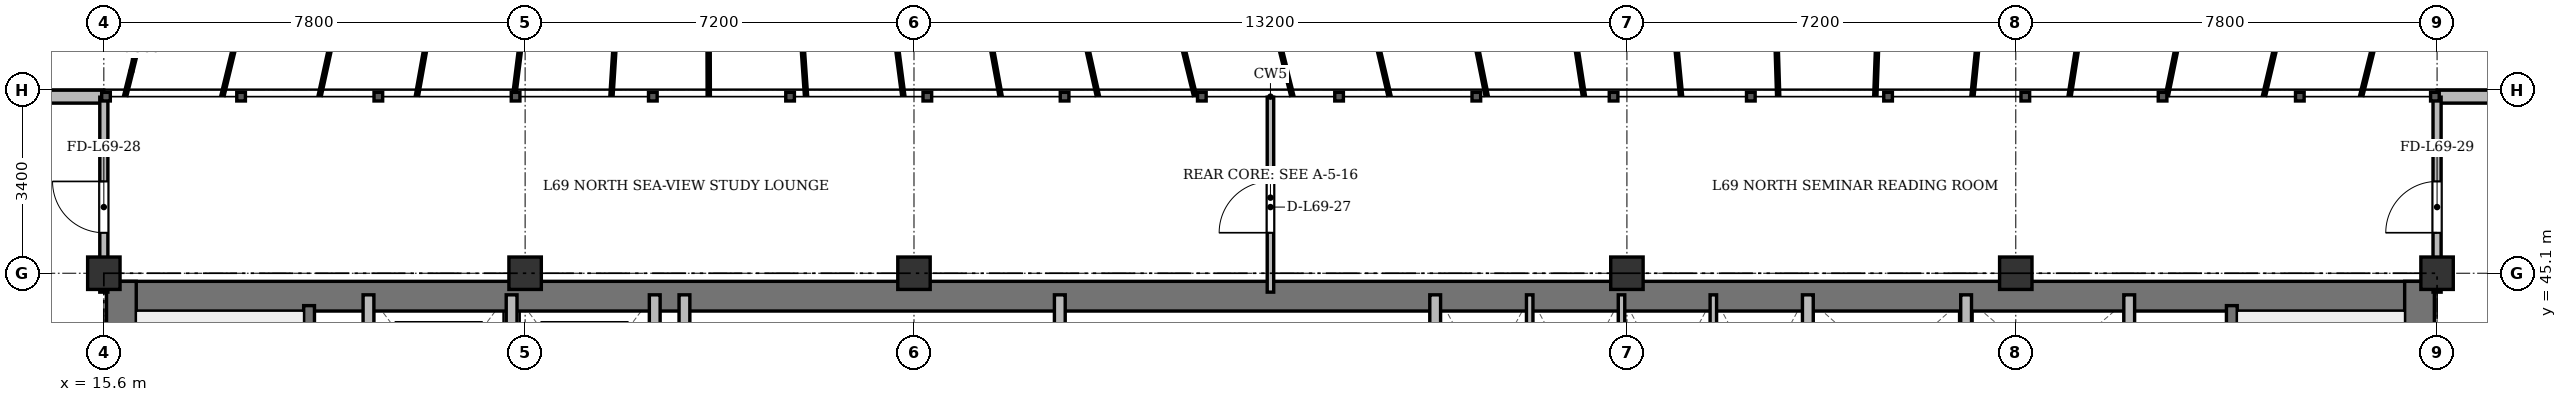
"""IFC4 building model, lengths in metres.
Left out: names, types, materials, properties, quantities, classifications, styles, units other than length and angle.
Written with IfcOpenShell. Run it as: python <this file> out.ifc"""

import sys

from ifc_helpers import new_model, si_unit, direction, frame, frame_2d, origin, origin_2d, place, context, subcontext, project, spatial, rectangle, extrude, source, transform, mapped, element, fill, save


model = new_model("IFC4")
c1 = context("Model", 3, precision=1e-05, world=origin(), true_north=direction((0.0, 1.0)))
c2 = subcontext(c1, "Body", "Model", "MODEL_VIEW")
j1 = project(units=[si_unit("LENGTHUNIT", "METRE"), si_unit("PLANEANGLEUNIT", "RADIAN")], contexts=[c1])
p1 = place(None, origin())
s1 = spatial("IfcSite", under=j1, at=p1, CompositionType="ELEMENT")
p2 = place(p1, origin())
s2 = spatial("IfcBuilding", under=s1, at=p2, CompositionType="ELEMENT")
p3 = place(p2, frame((0.0, 0.0, 266.7)))
s3 = spatial("IfcBuildingStorey", under=s2, at=p3, CompositionType="ELEMENT", Elevation=266.7)
m1 = source(origin(), c2, "Body", "SweptSolid", [
    extrude(rectangle(XDim=0.6, YDim=0.6, at=origin_2d()), origin(), (0.0, 0.0, 1.0), 3.6),
])
for number, where, z_axis, x_axis in (
    (1, (15.6, 45.1, 0.0), (0.0, 0.0, 1.0), (1.0, 0.0, 0.0)),
    (2, (23.4, 45.1, 0.0), (0.0, 0.0, 1.0), (1.0, 0.0, 0.0)),
    (3, (30.6, 45.1, 0.0), (0.0, 0.0, 1.0), (1.0, 0.0, 0.0)),
    (4, (43.8, 45.1, 0.0), (0.0, 0.0, 1.0), (1.0, 0.0, 0.0)),
    (5, (51.0, 45.1, 0.0), (0.0, 0.0, 1.0), (1.0, 0.0, 0.0)),
    (6, (58.8, 45.1, 0.0), (0.0, 0.0, 1.0), (1.0, 0.0, 0.0)),
):
    element("IfcColumn", number, at=place(p3, frame(where, z_axis=z_axis, x_axis=x_axis)), inside=s3, PredefinedType="COLUMN", context=c2, shape_type="MappedRepresentation", body=[
        mapped(m1, transform((0.0, 0.0, 0.0), x_axis=(1.0, 0.0, 0.0), y_axis=(0.0, 1.0, 0.0), z_axis=(0.0, 0.0, 1.0), scale=1.0)),
    ])
p4 = place(p3, frame((11.3, 48.37, 0.0), z_axis=(0.0, 0.0, 1.0), x_axis=(1.0, 0.0, 0.0)))
e7 = element("IfcWall", 7, at=p4, inside=s3, PredefinedType="SOLIDWALL", context=c2, shape_type="SweptSolid", body=[
    extrude(rectangle(XDim=4.3, YDim=0.24, at=frame_2d((2.15, 0.0))), origin(), (0.0, 0.0, 1.0), 3.37),
])
p5 = place(p4, frame((1.848, 0.0, 0.9)))
e8 = element("IfcOpeningElement", 8, at=p5, cuts=e7, PredefinedType="OPENING", context=c2, shape_type="SweptSolid", body=[
    extrude(rectangle(XDim=1.35, YDim=1.5, at=frame_2d((0.675, 0.75))), frame((0.0, 0.13, 0.0), z_axis=(0.0, -1.0, 0.0), x_axis=(1.0, 0.0, 0.0)), (0.0, 0.0, 1.0), 0.26),
])
p6 = place(p3, frame((58.8, 48.37, 0.0), z_axis=(0.0, 0.0, 1.0), x_axis=(1.0, 0.0, 0.0)))
e9 = element("IfcWall", 9, at=p6, inside=s3, PredefinedType="SOLIDWALL", context=c2, shape_type="SweptSolid", body=[
    extrude(rectangle(XDim=4.3, YDim=0.24, at=frame_2d((2.15, 0.0))), origin(), (0.0, 0.0, 1.0), 3.37),
])
p7 = place(p6, frame((1.475, 0.0, 0.9)))
e10 = element("IfcOpeningElement", 10, at=p7, cuts=e9, PredefinedType="OPENING", context=c2, shape_type="SweptSolid", body=[
    extrude(rectangle(XDim=1.35, YDim=1.5, at=frame_2d((0.675, 0.75))), frame((0.0, 0.13, 0.0), z_axis=(0.0, -1.0, 0.0), x_axis=(1.0, 0.0, 0.0)), (0.0, 0.0, 1.0), 0.26),
])
p8 = place(p3, frame((15.65, 44.675, 0.0), z_axis=(0.0, 0.0, 1.0), x_axis=(1.0, 0.0, 0.0)))
e11 = element("IfcWall", 11, at=p8, inside=s3, PredefinedType="SHEAR", context=c2, shape_type="SweptSolid", body=[
    extrude(rectangle(XDim=43.1, YDim=0.55, at=frame_2d((21.55, 0.0))), origin(), (0.0, 0.0, 1.0), 3.37),
])
for number, where, z_axis, x_axis in (
    (12, (15.925, 33.4, 0.0), (0.0, 0.0, 1.0), (0.0, 1.0, 0.0)),
    (13, (58.475, 33.4, 0.0), (0.0, 0.0, 1.0), (0.0, 1.0, 0.0)),
):
    element("IfcWall", number, at=place(p3, frame(where, z_axis=z_axis, x_axis=x_axis)), inside=s3, PredefinedType="SHEAR", context=c2, shape_type="SweptSolid", body=[
        extrude(rectangle(XDim=11.55, YDim=0.55, at=frame_2d((5.775, 0.0))), origin(), (0.0, 0.0, 1.0), 3.37),
    ])
p9 = place(p3, frame((19.4, 33.4, 0.0), z_axis=(0.0, 0.0, 1.0), x_axis=(0.0, 1.0, 0.0)))
e14 = element("IfcWall", 14, at=p9, inside=s3, PredefinedType="SHEAR", context=c2, shape_type="SweptSolid", body=[
    extrude(rectangle(XDim=11.1, YDim=0.2, at=frame_2d((5.55, 0.0))), origin(), (0.0, 0.0, 1.0), 3.37),
])
p10 = place(p9, frame((0.85, 0.0, 0.0)))
e15 = element("IfcOpeningElement", 15, at=p10, cuts=e14, PredefinedType="OPENING", context=c2, shape_type="SweptSolid", body=[
    extrude(rectangle(XDim=1.1, YDim=2.15, at=frame_2d((0.55, 1.075))), frame((0.0, 0.11, 0.0), z_axis=(0.0, -1.0, 0.0), x_axis=(1.0, 0.0, 0.0)), (0.0, 0.0, 1.0), 0.22),
])
p11 = place(p3, frame((55.0, 33.4, 0.0), z_axis=(0.0, 0.0, 1.0), x_axis=(0.0, 1.0, 0.0)))
e16 = element("IfcWall", 16, at=p11, inside=s3, PredefinedType="SHEAR", context=c2, shape_type="SweptSolid", body=[
    extrude(rectangle(XDim=11.1, YDim=0.2, at=frame_2d((5.55, 0.0))), origin(), (0.0, 0.0, 1.0), 3.37),
])
p12 = place(p11, frame((0.85, 0.0, 0.0)))
e17 = element("IfcOpeningElement", 17, at=p12, cuts=e16, PredefinedType="OPENING", context=c2, shape_type="SweptSolid", body=[
    extrude(rectangle(XDim=1.1, YDim=2.15, at=frame_2d((0.55, 1.075))), frame((0.0, 0.11, 0.0), z_axis=(0.0, -1.0, 0.0), x_axis=(1.0, 0.0, 0.0)), (0.0, 0.0, 1.0), 0.22),
])
for number, where, z_axis, x_axis in (
    (18, (20.5, 41.3, 0.0), (0.0, 0.0, 1.0), (0.0, 1.0, 0.0)),
    (19, (23.15, 41.3, 0.0), (0.0, 0.0, 1.0), (0.0, 1.0, 0.0)),
    (20, (25.8, 41.3, 0.0), (0.0, 0.0, 1.0), (0.0, 1.0, 0.0)),
):
    element("IfcWall", number, at=place(p3, frame(where, z_axis=z_axis, x_axis=x_axis)), inside=s3, PredefinedType="SOLIDWALL", context=c2, shape_type="SweptSolid", body=[
        extrude(rectangle(XDim=3.4, YDim=0.2, at=frame_2d((1.7, 0.0))), origin(), (0.0, 0.0, 1.0), 3.37),
    ])
for number, where, z_axis, x_axis in (
    (21, (26.35, 33.4, 0.0), (0.0, 0.0, 1.0), (0.0, 1.0, 0.0)),
    (22, (33.3, 33.4, 0.0), (0.0, 0.0, 1.0), (0.0, 1.0, 0.0)),
):
    element("IfcWall", number, at=place(p3, frame(where, z_axis=z_axis, x_axis=x_axis)), inside=s3, PredefinedType="SOLIDWALL", context=c2, shape_type="SweptSolid", body=[
        extrude(rectangle(XDim=11.3, YDim=0.2, at=frame_2d((5.65, 0.0))), origin(), (0.0, 0.0, 1.0), 2.92),
    ])
p13 = place(p3, frame((40.25, 41.5, 0.0), z_axis=(0.0, 0.0, 1.0), x_axis=(0.0, 1.0, 0.0)))
e23 = element("IfcWall", 23, at=p13, inside=s3, PredefinedType="SOLIDWALL", context=c2, shape_type="SweptSolid", body=[
    extrude(rectangle(XDim=3.2, YDim=0.2, at=frame_2d((1.6, 0.0))), origin(), (0.0, 0.0, 1.0), 3.37),
])
for number, where, z_axis, x_axis in (
    (24, (42.0, 41.5, 0.0), (0.0, 0.0, 1.0), (0.0, 1.0, 0.0)),
    (25, (43.7, 41.5, 0.0), (0.0, 0.0, 1.0), (0.0, 1.0, 0.0)),
    (26, (45.4, 41.5, 0.0), (0.0, 0.0, 1.0), (0.0, 1.0, 0.0)),
):
    element("IfcWall", number, at=place(p3, frame(where, z_axis=z_axis, x_axis=x_axis)), inside=s3, PredefinedType="PARTITIONING", context=c2, shape_type="SweptSolid", body=[
        extrude(rectangle(XDim=3.2, YDim=0.12, at=frame_2d((1.6, 0.0))), origin(), (0.0, 0.0, 1.0), 3.37),
    ])
p14 = place(p3, frame((47.15, 33.4, 0.0), z_axis=(0.0, 0.0, 1.0), x_axis=(0.0, 1.0, 0.0)))
e27 = element("IfcWall", 27, at=p14, inside=s3, PredefinedType="SOLIDWALL", context=c2, shape_type="SweptSolid", body=[
    extrude(rectangle(XDim=11.3, YDim=0.2, at=frame_2d((5.65, 0.0))), origin(), (0.0, 0.0, 1.0), 2.92),
])
for number, where, z_axis, x_axis in (
    (28, (50.08, 42.05, 0.0), (0.0, 0.0, 1.0), (0.0, 1.0, 0.0)),
    (29, (53.1, 42.05, 0.0), (0.0, 0.0, 1.0), (0.0, 1.0, 0.0)),
):
    element("IfcWall", number, at=place(p3, frame(where, z_axis=z_axis, x_axis=x_axis)), inside=s3, PredefinedType="SOLIDWALL", context=c2, shape_type="SweptSolid", body=[
        extrude(rectangle(XDim=2.65, YDim=0.2, at=frame_2d((1.325, 0.0))), origin(), (0.0, 0.0, 1.0), 3.37),
    ])
p15 = place(p3, frame((37.2, 44.75, 0.0), z_axis=(0.0, 0.0, 1.0), x_axis=(0.0, 1.0, 0.0)))
e30 = element("IfcWall", 30, at=p15, inside=s3, PredefinedType="PARTITIONING", context=c2, shape_type="SweptSolid", body=[
    extrude(rectangle(XDim=3.61, YDim=0.12, at=frame_2d((1.805, 0.0))), origin(), (0.0, 0.0, 1.0), 2.92),
])
p16 = place(p15, frame((1.1, 0.0, 0.0)))
e31 = element("IfcOpeningElement", 31, at=p16, cuts=e30, PredefinedType="OPENING", context=c2, shape_type="SweptSolid", body=[
    extrude(rectangle(XDim=0.95, YDim=2.15, at=frame_2d((0.475, 1.075))), frame((0.0, 0.07, 0.0), z_axis=(0.0, -1.0, 0.0), x_axis=(1.0, 0.0, 0.0)), (0.0, 0.0, 1.0), 0.14),
])
p17 = place(p3, frame((15.6, 44.75, 0.0), z_axis=(0.0, 0.0, 1.0), x_axis=(0.0, 1.0, 0.0)))
e32 = element("IfcWall", 32, at=p17, inside=s3, PredefinedType="PARTITIONING", context=c2, shape_type="SweptSolid", body=[
    extrude(rectangle(XDim=3.61, YDim=0.15, at=frame_2d((1.805, 0.0))), origin(), (0.0, 0.0, 1.0), 2.87),
])
p18 = place(p17, frame((1.1, 0.0, 0.0)))
e33 = element("IfcOpeningElement", 33, at=p18, cuts=e32, PredefinedType="OPENING", context=c2, shape_type="SweptSolid", body=[
    extrude(rectangle(XDim=0.95, YDim=2.15, at=frame_2d((0.475, 1.075))), frame((0.0, 0.085, 0.0), z_axis=(0.0, -1.0, 0.0), x_axis=(1.0, 0.0, 0.0)), (0.0, 0.0, 1.0), 0.17),
])
p19 = place(p3, frame((58.8, 44.75, 0.0), z_axis=(0.0, 0.0, 1.0), x_axis=(0.0, 1.0, 0.0)))
e34 = element("IfcWall", 34, at=p19, inside=s3, PredefinedType="PARTITIONING", context=c2, shape_type="SweptSolid", body=[
    extrude(rectangle(XDim=3.61, YDim=0.15, at=frame_2d((1.805, 0.0))), origin(), (0.0, 0.0, 1.0), 2.87),
])
p20 = place(p19, frame((1.1, 0.0, 0.0)))
e35 = element("IfcOpeningElement", 35, at=p20, cuts=e34, PredefinedType="OPENING", context=c2, shape_type="SweptSolid", body=[
    extrude(rectangle(XDim=0.95, YDim=2.15, at=frame_2d((0.475, 1.075))), frame((0.0, 0.085, 0.0), z_axis=(0.0, -1.0, 0.0), x_axis=(1.0, 0.0, 0.0)), (0.0, 0.0, 1.0), 0.17),
])
m2 = source(origin(), c2, "Body", "SweptSolid", [
    extrude(rectangle(XDim=0.95, YDim=2.15, at=frame_2d((0.475, 1.075))), frame((0.0, 0.025, 0.0), z_axis=(0.0, -1.0, 0.0), x_axis=(1.0, 0.0, 0.0)), (0.0, 0.0, 1.0), 0.05),
])
p21 = place(p16, origin())
e36 = element("IfcDoor", 36, at=p21, inside=s3, OperationType="SINGLE_SWING_LEFT", PredefinedType="DOOR", context=c2, shape_type="MappedRepresentation", body=[
    mapped(m2, transform((0.0, 0.0, 0.0), x_axis=(1.0, 0.0, 0.0), y_axis=(0.0, 1.0, 0.0), z_axis=(0.0, 0.0, 1.0), scale=1.0)),
])
fill(e31, e36)
p22 = place(p18, origin())
e37 = element("IfcDoor", 37, at=p22, inside=s3, OperationType="SINGLE_SWING_RIGHT", PredefinedType="DOOR", context=c2, shape_type="MappedRepresentation", body=[
    mapped(m2, transform((0.0, 0.0, 0.0), x_axis=(1.0, 0.0, 0.0), y_axis=(0.0, 1.0, 0.0), z_axis=(0.0, 0.0, 1.0), scale=1.0)),
])
fill(e33, e37)
p23 = place(p20, origin())
e38 = element("IfcDoor", 38, at=p23, inside=s3, OperationType="SINGLE_SWING_LEFT", PredefinedType="DOOR", context=c2, shape_type="MappedRepresentation", body=[
    mapped(m2, transform((0.0, 0.0, 0.0), x_axis=(1.0, 0.0, 0.0), y_axis=(0.0, 1.0, 0.0), z_axis=(0.0, 0.0, 1.0), scale=1.0)),
])
fill(e35, e38)
save(model, sys.argv[1])
